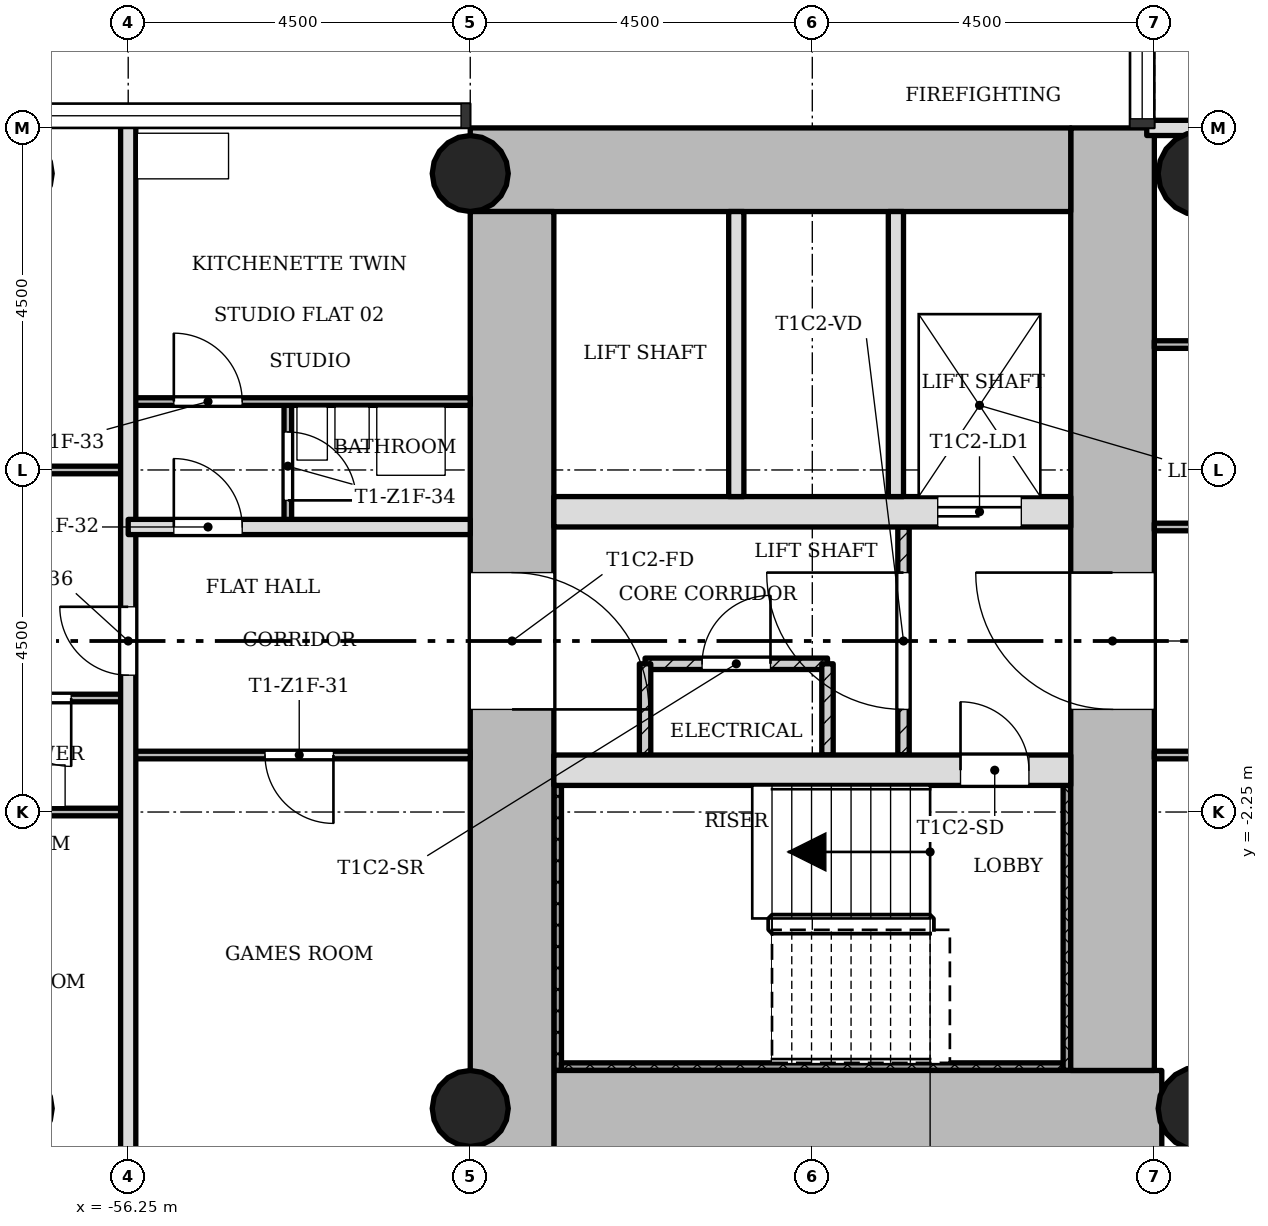
"""IFC4 building model, lengths in metres.
Left out: names, types, materials, properties, quantities, classifications, styles, units other than length and angle.
Written with IfcOpenShell. Run it as: python <this file> out.ifc"""

import sys

from ifc_helpers import new_model, si_unit, direction, frame, frame_2d, origin, origin_2d, place, context, subcontext, project, spatial, rectangle, hollow_circle, extrude, element, fill, save


model = new_model("IFC4")
c1 = context("Model", 3, precision=1e-05, world=origin(), true_north=direction((0.0, 1.0)))
c2 = subcontext(c1, "Body", "Model", "MODEL_VIEW")
j1 = project(units=[si_unit("LENGTHUNIT", "METRE"), si_unit("PLANEANGLEUNIT", "RADIAN")], contexts=[c1])
p1 = place(None, origin())
s1 = spatial("IfcSite", under=j1, at=p1, CompositionType="ELEMENT")
p2 = place(p1, origin())
s2 = spatial("IfcBuilding", under=s1, at=p2, CompositionType="ELEMENT")
p3 = place(p2, frame((0.0, 0.0, 68.7)))
s3 = spatial("IfcBuildingStorey", under=s2, at=p3, CompositionType="ELEMENT", Elevation=68.7)
p4 = place(p3, frame((-50.65, -6.2, 0.0), z_axis=(0.0, 0.0, 1.0), x_axis=(1.0, 0.0, 0.0)))
e1 = element("IfcWall", 1, at=p4, inside=s3, PredefinedType="SHEAR", context=c2, shape_type="SweptSolid", body=[
    extrude(rectangle(XDim=7.998, YDim=1.1, at=frame_2d((3.999, 0.0))), origin(), (0.0, 0.0, 1.0), 3.4),
])
p5 = place(p3, frame((-43.3, -5.65, 0.0), z_axis=(0.0, 0.0, 1.0), x_axis=(0.0, 1.0, 0.0)))
e2 = element("IfcWall", 2, at=p5, inside=s3, PredefinedType="SHEAR", context=c2, shape_type="SweptSolid", body=[
    extrude(rectangle(XDim=12.4, YDim=1.1, at=frame_2d((6.2, 0.0))), origin(), (0.0, 0.0, 1.0), 3.4),
])
p6 = place(p5, frame((4.75, 0.0, 0.0)))
e3 = element("IfcOpeningElement", 3, at=p6, cuts=e2, PredefinedType="OPENING", context=c2, shape_type="SweptSolid", body=[
    extrude(rectangle(XDim=1.8, YDim=2.1, at=frame_2d((0.9, 1.05))), frame((0.0, 0.56, 0.0), z_axis=(0.0, -1.0, 0.0), x_axis=(1.0, 0.0, 0.0)), (0.0, 0.0, 1.0), 1.12),
])
p7 = place(p3, frame((-43.85, 6.2, 0.0), z_axis=(0.0, 0.0, 1.0), x_axis=(-1.0, 0.0, 0.0)))
e4 = element("IfcWall", 4, at=p7, inside=s3, PredefinedType="SHEAR", context=c2, shape_type="SweptSolid", body=[
    extrude(rectangle(XDim=7.9, YDim=1.1, at=frame_2d((3.95, 0.0))), origin(), (0.0, 0.0, 1.0), 3.4),
])
p8 = place(p3, frame((-51.2, 5.65, 0.0), z_axis=(0.0, 0.0, 1.0), x_axis=(0.0, -1.0, 0.0)))
e5 = element("IfcWall", 5, at=p8, inside=s3, PredefinedType="SHEAR", context=c2, shape_type="SweptSolid", body=[
    extrude(rectangle(XDim=12.4, YDim=1.1, at=frame_2d((6.2, 0.0))), origin(), (0.0, 0.0, 1.0), 3.4),
])
p9 = place(p8, frame((4.75, 0.0, 0.0)))
e6 = element("IfcOpeningElement", 6, at=p9, cuts=e5, PredefinedType="OPENING", context=c2, shape_type="SweptSolid", body=[
    extrude(rectangle(XDim=1.8, YDim=2.1, at=frame_2d((0.9, 1.05))), frame((0.0, 0.56, 0.0), z_axis=(0.0, -1.0, 0.0), x_axis=(1.0, 0.0, 0.0)), (0.0, 0.0, 1.0), 1.12),
])
p10 = place(p3, frame((-50.65, -1.7, 0.0), z_axis=(0.0, 0.0, 1.0), x_axis=(1.0, 0.0, 0.0)))
e7 = element("IfcWall", 7, at=p10, inside=s3, PredefinedType="SHEAR", context=c2, shape_type="SweptSolid", body=[
    extrude(rectangle(XDim=6.8, YDim=0.4, at=frame_2d((3.4, 0.0))), origin(), (0.0, 0.0, 1.0), 3.4),
])
p11 = place(p10, frame((5.35, 0.0, 0.0)))
e8 = element("IfcOpeningElement", 8, at=p11, cuts=e7, PredefinedType="OPENING", context=c2, shape_type="SweptSolid", body=[
    extrude(rectangle(XDim=0.9, YDim=2.1, at=frame_2d((0.45, 1.05))), frame((0.0, 0.21, 0.0), z_axis=(0.0, -1.0, 0.0), x_axis=(1.0, 0.0, 0.0)), (0.0, 0.0, 1.0), 0.42),
])
p12 = place(p3, frame((-50.65, 1.7, 0.0), z_axis=(0.0, 0.0, 1.0), x_axis=(1.0, 0.0, 0.0)))
e9 = element("IfcWall", 9, at=p12, inside=s3, PredefinedType="SHEAR", context=c2, shape_type="SweptSolid", body=[
    extrude(rectangle(XDim=6.8, YDim=0.4, at=frame_2d((3.4, 0.0))), origin(), (0.0, 0.0, 1.0), 3.4),
])
p13 = place(p12, frame((5.05, 0.0, 0.0)))
e10 = element("IfcOpeningElement", 10, at=p13, cuts=e9, PredefinedType="OPENING", context=c2, shape_type="SweptSolid", body=[
    extrude(rectangle(XDim=1.1, YDim=2.1, at=frame_2d((0.55, 1.05))), frame((0.0, 0.21, 0.0), z_axis=(0.0, -1.0, 0.0), x_axis=(1.0, 0.0, 0.0)), (0.0, 0.0, 1.0), 0.42),
])
for number, where, z_axis, x_axis in (
    (11, (-51.75, -6.15, 0.0), (0.0, 0.0, 1.0), (1.0, 0.0, 0.0)),
    (12, (-51.75, 6.15, 0.0), (0.0, 0.0, 1.0), (1.0, 0.0, 0.0)),
):
    element("IfcColumn", number, at=place(p3, frame(where, z_axis=z_axis, x_axis=x_axis)), inside=s3, PredefinedType="COLUMN", context=c2, shape_type="SweptSolid", body=[
        extrude(hollow_circle(Radius=0.5, WallThickness=0.036, at=origin_2d()), origin(), (0.0, 0.0, 1.0), 3.4),
    ])
for number, where, z_axis, x_axis in (
    (13, (-42.15, -6.15, 0.0), (0.0, 0.0, 1.0), (1.0, 0.0, 0.0)),
    (14, (-42.15, 6.15, 0.0), (0.0, 0.0, 1.0), (1.0, 0.0, 0.0)),
):
    element("IfcColumn", number, at=place(p3, frame(where, z_axis=z_axis, x_axis=x_axis)), inside=s3, PredefinedType="COLUMN", context=c2, shape_type="SweptSolid", body=[
        extrude(hollow_circle(Radius=0.55, WallThickness=0.04, at=origin_2d()), origin(), (0.0, 0.0, 1.0), 3.4),
    ])
p14 = place(p3, frame((-46.05, 1.5, 0.0), z_axis=(0.0, 0.0, 1.0), x_axis=(0.0, -1.0, 0.0)))
e15 = element("IfcWall", 15, at=p14, inside=s3, PredefinedType="PARTITIONING", context=c2, shape_type="SweptSolid", body=[
    extrude(rectangle(XDim=3.0, YDim=0.15, at=frame_2d((1.5, 0.0))), origin(), (0.0, 0.0, 1.0), 3.0),
])
p15 = place(p14, frame((0.6, 0.0, 0.0)))
e16 = element("IfcOpeningElement", 16, at=p15, cuts=e15, PredefinedType="OPENING", context=c2, shape_type="SweptSolid", body=[
    extrude(rectangle(XDim=1.8, YDim=2.1, at=frame_2d((0.9, 1.05))), frame((0.0, 0.085, 0.0), z_axis=(0.0, -1.0, 0.0), x_axis=(1.0, 0.0, 0.0)), (0.0, 0.0, 1.0), 0.17),
])
for number, where, z_axis, x_axis in (
    (17, (-46.15, 5.65, 0.0), (0.0, 0.0, 1.0), (0.0, -1.0, 0.0)),
    (18, (-48.25, 5.65, 0.0), (0.0, 0.0, 1.0), (0.0, -1.0, 0.0)),
):
    element("IfcWall", number, at=place(p3, frame(where, z_axis=z_axis, x_axis=x_axis)), inside=s3, PredefinedType="SOLIDWALL", context=c2, shape_type="SweptSolid", body=[
        extrude(rectangle(XDim=3.75, YDim=0.2, at=frame_2d((1.875, 0.0))), origin(), (0.0, 0.0, 1.0), 3.0),
    ])
p16 = place(p3, frame((-47.05, -0.3, 0.0), z_axis=(0.0, 0.0, 1.0), x_axis=(-1.0, 0.0, 0.0)))
e19 = element("IfcWall", 19, at=p16, inside=s3, PredefinedType="PARTITIONING", context=c2, shape_type="SweptSolid", body=[
    extrude(rectangle(XDim=2.4, YDim=0.15, at=frame_2d((1.2, 0.0))), origin(), (0.0, 0.0, 1.0), 3.0),
])
p17 = place(p16, frame((0.75, 0.0, 0.0)))
e20 = element("IfcOpeningElement", 20, at=p17, cuts=e19, PredefinedType="OPENING", context=c2, shape_type="SweptSolid", body=[
    extrude(rectangle(XDim=0.9, YDim=2.1, at=frame_2d((0.45, 1.05))), frame((0.0, 0.085, 0.0), z_axis=(0.0, -1.0, 0.0), x_axis=(1.0, 0.0, 0.0)), (0.0, 0.0, 1.0), 0.17),
])
for number, where, z_axis, x_axis in (
    (21, (-47.05, -0.3, 0.0), (0.0, 0.0, 1.0), (0.0, -1.0, 0.0)),
    (22, (-49.45, -0.3, 0.0), (0.0, 0.0, 1.0), (0.0, -1.0, 0.0)),
):
    element("IfcWall", number, at=place(p3, frame(where, z_axis=z_axis, x_axis=x_axis)), inside=s3, PredefinedType="PARTITIONING", context=c2, shape_type="SweptSolid", body=[
        extrude(rectangle(XDim=1.2, YDim=0.15, at=frame_2d((0.6, 0.0))), origin(), (0.0, 0.0, 1.0), 3.0),
    ])
p18 = place(p3, frame((-56.25, -6.85, 0.0), z_axis=(0.0, 0.0, 1.0), x_axis=(0.0, 1.0, 0.0)))
e23 = element("IfcWall", 23, at=p18, inside=s3, PredefinedType="SOLIDWALL", context=c2, shape_type="SweptSolid", body=[
    extrude(rectangle(XDim=13.7, YDim=0.2, at=frame_2d((6.85, 0.0))), origin(), (0.0, 0.0, 1.0), 3.0),
])
p19 = place(p18, frame((6.4, 0.0, 0.0)))
e24 = element("IfcOpeningElement", 24, at=p19, cuts=e23, PredefinedType="OPENING", context=c2, shape_type="SweptSolid", body=[
    extrude(rectangle(XDim=0.9, YDim=2.1, at=frame_2d((0.45, 1.05))), frame((0.0, 0.11, 0.0), z_axis=(0.0, -1.0, 0.0), x_axis=(1.0, 0.0, 0.0)), (0.0, 0.0, 1.0), 0.22),
])
p20 = place(p3, frame((-54.15, 1.5, 0.0), z_axis=(0.0, 0.0, 1.0), x_axis=(0.0, 1.0, 0.0)))
e25 = element("IfcWall", 25, at=p20, inside=s3, PredefinedType="PARTITIONING", context=c2, shape_type="SweptSolid", body=[
    extrude(rectangle(XDim=1.65, YDim=0.1, at=frame_2d((0.825, 0.0))), origin(), (0.0, 0.0, 1.0), 3.0),
])
p21 = place(p20, frame((0.35, 0.0, 0.0)))
e26 = element("IfcOpeningElement", 26, at=p21, cuts=e25, PredefinedType="OPENING", context=c2, shape_type="SweptSolid", body=[
    extrude(rectangle(XDim=0.9, YDim=2.1, at=frame_2d((0.45, 1.05))), frame((0.0, 0.06, 0.0), z_axis=(0.0, -1.0, 0.0), x_axis=(1.0, 0.0, 0.0)), (0.0, 0.0, 1.0), 0.12),
])
p22 = place(p3, frame((-60.85, -2.25, 0.0), z_axis=(0.0, 0.0, 1.0), x_axis=(1.0, 0.0, 0.0)))
e27 = element("IfcWall", 27, at=p22, inside=s3, PredefinedType="PARTITIONING", context=c2, shape_type="SweptSolid", body=[
    extrude(rectangle(XDim=4.6, YDim=0.1, at=frame_2d((2.3, 0.0))), origin(), (0.0, 0.0, 1.0), 3.0),
])
p23 = place(p22, frame((1.25, 0.0, 0.0)))
e28 = element("IfcOpeningElement", 28, at=p23, cuts=e27, PredefinedType="OPENING", context=c2, shape_type="SweptSolid", body=[
    extrude(rectangle(XDim=0.9, YDim=2.1, at=frame_2d((0.45, 1.05))), frame((0.0, 0.06, 0.0), z_axis=(0.0, -1.0, 0.0), x_axis=(1.0, 0.0, 0.0)), (0.0, 0.0, 1.0), 0.12),
])
p24 = place(p3, frame((-56.25, -1.5, 0.0), z_axis=(0.0, 0.0, 1.0), x_axis=(1.0, 0.0, 0.0)))
e29 = element("IfcWall", 29, at=p24, inside=s3, PredefinedType="PARTITIONING", context=c2, shape_type="SweptSolid", body=[
    extrude(rectangle(XDim=4.5, YDim=0.1, at=frame_2d((2.25, 0.0))), origin(), (0.0, 0.0, 1.0), 3.0),
])
p25 = place(p24, frame((1.8, 0.0, 0.0)))
e30 = element("IfcOpeningElement", 30, at=p25, cuts=e29, PredefinedType="OPENING", context=c2, shape_type="SweptSolid", body=[
    extrude(rectangle(XDim=0.9, YDim=2.1, at=frame_2d((0.45, 1.05))), frame((0.0, 0.06, 0.0), z_axis=(0.0, -1.0, 0.0), x_axis=(1.0, 0.0, 0.0)), (0.0, 0.0, 1.0), 0.12),
])
p26 = place(p3, frame((-42.75, -1.5, 0.0), z_axis=(0.0, 0.0, 1.0), x_axis=(1.0, 0.0, 0.0)))
e31 = element("IfcWall", 31, at=p26, inside=s3, PredefinedType="PARTITIONING", context=c2, shape_type="SweptSolid", body=[
    extrude(rectangle(XDim=5.85, YDim=0.1, at=frame_2d((2.925, 0.0))), origin(), (0.0, 0.0, 1.0), 3.0),
])
p27 = place(p26, frame((2.475, 0.0, 0.0)))
e32 = element("IfcOpeningElement", 32, at=p27, cuts=e31, PredefinedType="OPENING", context=c2, shape_type="SweptSolid", body=[
    extrude(rectangle(XDim=0.9, YDim=2.1, at=frame_2d((0.45, 1.05))), frame((0.0, 0.06, 0.0), z_axis=(0.0, -1.0, 0.0), x_axis=(1.0, 0.0, 0.0)), (0.0, 0.0, 1.0), 0.12),
])
p28 = place(p3, frame((-58.65, -0.75, 0.0), z_axis=(0.0, 0.0, 1.0), x_axis=(1.0, 0.0, 0.0)))
e33 = element("IfcWall", 33, at=p28, inside=s3, PredefinedType="PARTITIONING", context=c2, shape_type="SweptSolid", body=[
    extrude(rectangle(XDim=2.4, YDim=0.1, at=frame_2d((1.2, 0.0))), origin(), (0.0, 0.0, 1.0), 3.0),
])
p29 = place(p28, frame((0.75, 0.0, 0.0)))
e34 = element("IfcOpeningElement", 34, at=p29, cuts=e33, PredefinedType="OPENING", context=c2, shape_type="SweptSolid", body=[
    extrude(rectangle(XDim=0.9, YDim=2.1, at=frame_2d((0.45, 1.05))), frame((0.0, 0.06, 0.0), z_axis=(0.0, -1.0, 0.0), x_axis=(1.0, 0.0, 0.0)), (0.0, 0.0, 1.0), 0.12),
])
p30 = place(p3, frame((-42.75, 1.5, 0.0), z_axis=(0.0, 0.0, 1.0), x_axis=(1.0, 0.0, 0.0)))
e35 = element("IfcWall", 35, at=p30, inside=s3, PredefinedType="PARTITIONING", context=c2, shape_type="SweptSolid", body=[
    extrude(rectangle(XDim=5.85, YDim=0.1, at=frame_2d((2.925, 0.0))), origin(), (0.0, 0.0, 1.0), 3.0),
])
p31 = place(p30, frame((1.575, 0.0, 0.0)))
e36 = element("IfcOpeningElement", 36, at=p31, cuts=e35, PredefinedType="OPENING", context=c2, shape_type="SweptSolid", body=[
    extrude(rectangle(XDim=0.9, YDim=2.1, at=frame_2d((0.45, 1.05))), frame((0.0, 0.06, 0.0), z_axis=(0.0, -1.0, 0.0), x_axis=(1.0, 0.0, 0.0)), (0.0, 0.0, 1.0), 0.12),
])
p32 = place(p3, frame((-56.25, 1.5, 0.0), z_axis=(0.0, 0.0, 1.0), x_axis=(1.0, 0.0, 0.0)))
e37 = element("IfcWall", 37, at=p32, inside=s3, PredefinedType="SOLIDWALL", context=c2, shape_type="SweptSolid", body=[
    extrude(rectangle(XDim=4.5, YDim=0.2, at=frame_2d((2.25, 0.0))), origin(), (0.0, 0.0, 1.0), 3.0),
])
p33 = place(p32, frame((0.6, 0.0, 0.0)))
e38 = element("IfcOpeningElement", 38, at=p33, cuts=e37, PredefinedType="OPENING", context=c2, shape_type="SweptSolid", body=[
    extrude(rectangle(XDim=0.9, YDim=2.1, at=frame_2d((0.45, 1.05))), frame((0.0, 0.11, 0.0), z_axis=(0.0, -1.0, 0.0), x_axis=(1.0, 0.0, 0.0)), (0.0, 0.0, 1.0), 0.22),
])
p34 = place(p3, frame((-60.85, 2.25, 0.0), z_axis=(0.0, 0.0, 1.0), x_axis=(1.0, 0.0, 0.0)))
e39 = element("IfcWall", 39, at=p34, inside=s3, PredefinedType="PARTITIONING", context=c2, shape_type="SweptSolid", body=[
    extrude(rectangle(XDim=4.6, YDim=0.1, at=frame_2d((2.3, 0.0))), origin(), (0.0, 0.0, 1.0), 3.0),
])
p35 = place(p34, frame((1.9, 0.0, 0.0)))
e40 = element("IfcOpeningElement", 40, at=p35, cuts=e39, PredefinedType="OPENING", context=c2, shape_type="SweptSolid", body=[
    extrude(rectangle(XDim=0.9, YDim=2.1, at=frame_2d((0.45, 1.05))), frame((0.0, 0.06, 0.0), z_axis=(0.0, -1.0, 0.0), x_axis=(1.0, 0.0, 0.0)), (0.0, 0.0, 1.0), 0.12),
])
p36 = place(p3, frame((-56.25, 3.15, 0.0), z_axis=(0.0, 0.0, 1.0), x_axis=(1.0, 0.0, 0.0)))
e41 = element("IfcWall", 41, at=p36, inside=s3, PredefinedType="PARTITIONING", context=c2, shape_type="SweptSolid", body=[
    extrude(rectangle(XDim=4.5, YDim=0.1, at=frame_2d((2.25, 0.0))), origin(), (0.0, 0.0, 1.0), 3.0),
])
p37 = place(p36, frame((0.6, 0.0, 0.0)))
e42 = element("IfcOpeningElement", 42, at=p37, cuts=e41, PredefinedType="OPENING", context=c2, shape_type="SweptSolid", body=[
    extrude(rectangle(XDim=0.9, YDim=2.1, at=frame_2d((0.45, 1.05))), frame((0.0, 0.06, 0.0), z_axis=(0.0, -1.0, 0.0), x_axis=(1.0, 0.0, 0.0)), (0.0, 0.0, 1.0), 0.12),
])
p38 = place(p3, frame((-42.75, 3.9, 0.0), z_axis=(0.0, 0.0, 1.0), x_axis=(1.0, 0.0, 0.0)))
e43 = element("IfcWall", 43, at=p38, inside=s3, PredefinedType="PARTITIONING", context=c2, shape_type="SweptSolid", body=[
    extrude(rectangle(XDim=5.85, YDim=0.1, at=frame_2d((2.925, 0.0))), origin(), (0.0, 0.0, 1.0), 3.0),
])
p39 = place(p3, frame((-42.85, 6.75, 0.0), z_axis=(0.0, 0.0, 1.0), x_axis=(1.0, 0.0, 0.0)))
e44 = element("IfcWall", 44, at=p39, inside=s3, PredefinedType="SOLIDWALL", context=c2, shape_type="SweptSolid", body=[
    extrude(rectangle(XDim=13.7, YDim=0.2, at=frame_2d((6.85, 0.0))), origin(), (0.0, 0.0, 1.0), 3.0),
])
p40 = place(p39, frame((6.4, 0.0, 0.0)))
e45 = element("IfcOpeningElement", 45, at=p40, cuts=e44, PredefinedType="OPENING", context=c2, shape_type="SweptSolid", body=[
    extrude(rectangle(XDim=0.9, YDim=2.1, at=frame_2d((0.45, 1.05))), frame((0.0, 0.11, 0.0), z_axis=(0.0, -1.0, 0.0), x_axis=(1.0, 0.0, 0.0)), (0.0, 0.0, 1.0), 0.22),
])
p41 = place(p3, frame((-50.6, -1.9, 0.0), z_axis=(0.0, 0.0, 1.0), x_axis=(0.0, -1.0, 0.0)))
e46 = element("IfcWall", 46, at=p41, inside=s3, PredefinedType="SHEAR", context=c2, shape_type="SweptSolid", body=[
    extrude(rectangle(XDim=3.75, YDim=0.1, at=frame_2d((1.875, 0.0))), origin(), (0.0, 0.0, 1.0), 3.4),
])
p42 = place(p3, frame((-43.95, -5.6, 0.0), z_axis=(0.0, 0.0, 1.0), x_axis=(-1.0, 0.0, 0.0)))
e47 = element("IfcWall", 47, at=p42, inside=s3, PredefinedType="SHEAR", context=c2, shape_type="SweptSolid", body=[
    extrude(rectangle(XDim=6.6, YDim=0.1, at=frame_2d((3.3, 0.0))), origin(), (0.0, 0.0, 1.0), 3.4),
])
p43 = place(p3, frame((-43.9, -1.9, 0.0), z_axis=(0.0, 0.0, 1.0), x_axis=(0.0, -1.0, 0.0)))
e48 = element("IfcWall", 48, at=p43, inside=s3, PredefinedType="SHEAR", context=c2, shape_type="SweptSolid", body=[
    extrude(rectangle(XDim=3.75, YDim=0.1, at=frame_2d((1.875, 0.0))), origin(), (0.0, 0.0, 1.0), 3.4),
])
p44 = place(p15, origin())
e49 = element("IfcDoor", 49, at=p44, inside=s3, OperationType="SINGLE_SWING_LEFT", PredefinedType="DOOR", context=c2, shape_type="SweptSolid", body=[
    extrude(rectangle(XDim=1.8, YDim=2.1, at=frame_2d((0.9, 1.05))), frame((0.0, 0.025, 0.0), z_axis=(0.0, -1.0, 0.0), x_axis=(1.0, 0.0, 0.0)), (0.0, 0.0, 1.0), 0.05),
])
fill(e16, e49)
p45 = place(p17, origin())
e50 = element("IfcDoor", 50, at=p45, inside=s3, OperationType="SINGLE_SWING_LEFT", PredefinedType="DOOR", context=c2, shape_type="SweptSolid", body=[
    extrude(rectangle(XDim=0.9, YDim=2.1, at=frame_2d((0.45, 1.05))), frame((0.0, 0.025, 0.0), z_axis=(0.0, -1.0, 0.0), x_axis=(1.0, 0.0, 0.0)), (0.0, 0.0, 1.0), 0.05),
])
fill(e20, e50)
p46 = place(p25, origin())
e51 = element("IfcDoor", 51, at=p46, inside=s3, OperationType="SINGLE_SWING_RIGHT", PredefinedType="DOOR", context=c2, shape_type="SweptSolid", body=[
    extrude(rectangle(XDim=0.9, YDim=2.1, at=frame_2d((0.45, 1.05))), frame((0.0, 0.025, 0.0), z_axis=(0.0, -1.0, 0.0), x_axis=(1.0, 0.0, 0.0)), (0.0, 0.0, 1.0), 0.05),
])
fill(e30, e51)
p47 = place(p33, origin())
e52 = element("IfcDoor", 52, at=p47, inside=s3, OperationType="SINGLE_SWING_RIGHT", PredefinedType="DOOR", context=c2, shape_type="SweptSolid", body=[
    extrude(rectangle(XDim=0.9, YDim=2.1, at=frame_2d((0.45, 1.05))), frame((0.0, 0.025, 0.0), z_axis=(0.0, -1.0, 0.0), x_axis=(1.0, 0.0, 0.0)), (0.0, 0.0, 1.0), 0.05),
])
fill(e38, e52)
p48 = place(p37, origin())
e53 = element("IfcDoor", 53, at=p48, inside=s3, OperationType="SINGLE_SWING_RIGHT", PredefinedType="DOOR", context=c2, shape_type="SweptSolid", body=[
    extrude(rectangle(XDim=0.9, YDim=2.1, at=frame_2d((0.45, 1.05))), frame((0.0, 0.025, 0.0), z_axis=(0.0, -1.0, 0.0), x_axis=(1.0, 0.0, 0.0)), (0.0, 0.0, 1.0), 0.05),
])
fill(e42, e53)
p49 = place(p21, origin())
e54 = element("IfcDoor", 54, at=p49, inside=s3, OperationType="SINGLE_SWING_LEFT", PredefinedType="DOOR", context=c2, shape_type="SweptSolid", body=[
    extrude(rectangle(XDim=0.9, YDim=2.1, at=frame_2d((0.45, 1.05))), frame((0.0, 0.025, 0.0), z_axis=(0.0, -1.0, 0.0), x_axis=(1.0, 0.0, 0.0)), (0.0, 0.0, 1.0), 0.05),
])
fill(e26, e54)
p50 = place(p29, origin())
e55 = element("IfcDoor", 55, at=p50, inside=s3, OperationType="SINGLE_SWING_RIGHT", PredefinedType="DOOR", context=c2, shape_type="SweptSolid", body=[
    extrude(rectangle(XDim=0.9, YDim=2.1, at=frame_2d((0.45, 1.05))), frame((0.0, 0.025, 0.0), z_axis=(0.0, -1.0, 0.0), x_axis=(1.0, 0.0, 0.0)), (0.0, 0.0, 1.0), 0.05),
])
fill(e34, e55)
p51 = place(p19, origin())
e56 = element("IfcDoor", 56, at=p51, inside=s3, OperationType="SINGLE_SWING_LEFT", PredefinedType="DOOR", context=c2, shape_type="SweptSolid", body=[
    extrude(rectangle(XDim=0.9, YDim=2.1, at=frame_2d((0.45, 1.05))), frame((0.0, 0.025, 0.0), z_axis=(0.0, -1.0, 0.0), x_axis=(1.0, 0.0, 0.0)), (0.0, 0.0, 1.0), 0.05),
])
fill(e24, e56)
p52 = place(p11, origin())
e57 = element("IfcDoor", 57, at=p52, inside=s3, OperationType="SINGLE_SWING_RIGHT", PredefinedType="DOOR", context=c2, shape_type="SweptSolid", body=[
    extrude(rectangle(XDim=0.9, YDim=2.1, at=frame_2d((0.45, 1.05))), frame((0.0, 0.025, 0.0), z_axis=(0.0, -1.0, 0.0), x_axis=(1.0, 0.0, 0.0)), (0.0, 0.0, 1.0), 0.05),
])
fill(e8, e57)
p53 = place(p13, origin())
e58 = element("IfcDoor", 58, at=p53, inside=s3, OperationType="SLIDING_TO_LEFT", PredefinedType="DOOR", context=c2, shape_type="SweptSolid", body=[
    extrude(rectangle(XDim=1.1, YDim=2.1, at=frame_2d((0.55, 1.05))), frame((0.0, 0.025, 0.0), z_axis=(0.0, -1.0, 0.0), x_axis=(1.0, 0.0, 0.0)), (0.0, 0.0, 1.0), 0.05),
])
fill(e10, e58)
p54 = place(p6, origin())
e59 = element("IfcDoor", 59, at=p54, inside=s3, OperationType="SINGLE_SWING_LEFT", PredefinedType="DOOR", context=c2, shape_type="SweptSolid", body=[
    extrude(rectangle(XDim=1.8, YDim=2.1, at=frame_2d((0.9, 1.05))), frame((0.0, 0.025, 0.0), z_axis=(0.0, -1.0, 0.0), x_axis=(1.0, 0.0, 0.0)), (0.0, 0.0, 1.0), 0.05),
])
fill(e3, e59)
p55 = place(p9, origin())
e60 = element("IfcDoor", 60, at=p55, inside=s3, OperationType="SINGLE_SWING_LEFT", PredefinedType="DOOR", context=c2, shape_type="SweptSolid", body=[
    extrude(rectangle(XDim=1.8, YDim=2.1, at=frame_2d((0.9, 1.05))), frame((0.0, 0.025, 0.0), z_axis=(0.0, -1.0, 0.0), x_axis=(1.0, 0.0, 0.0)), (0.0, 0.0, 1.0), 0.05),
])
fill(e6, e60)
save(model, sys.argv[1])
